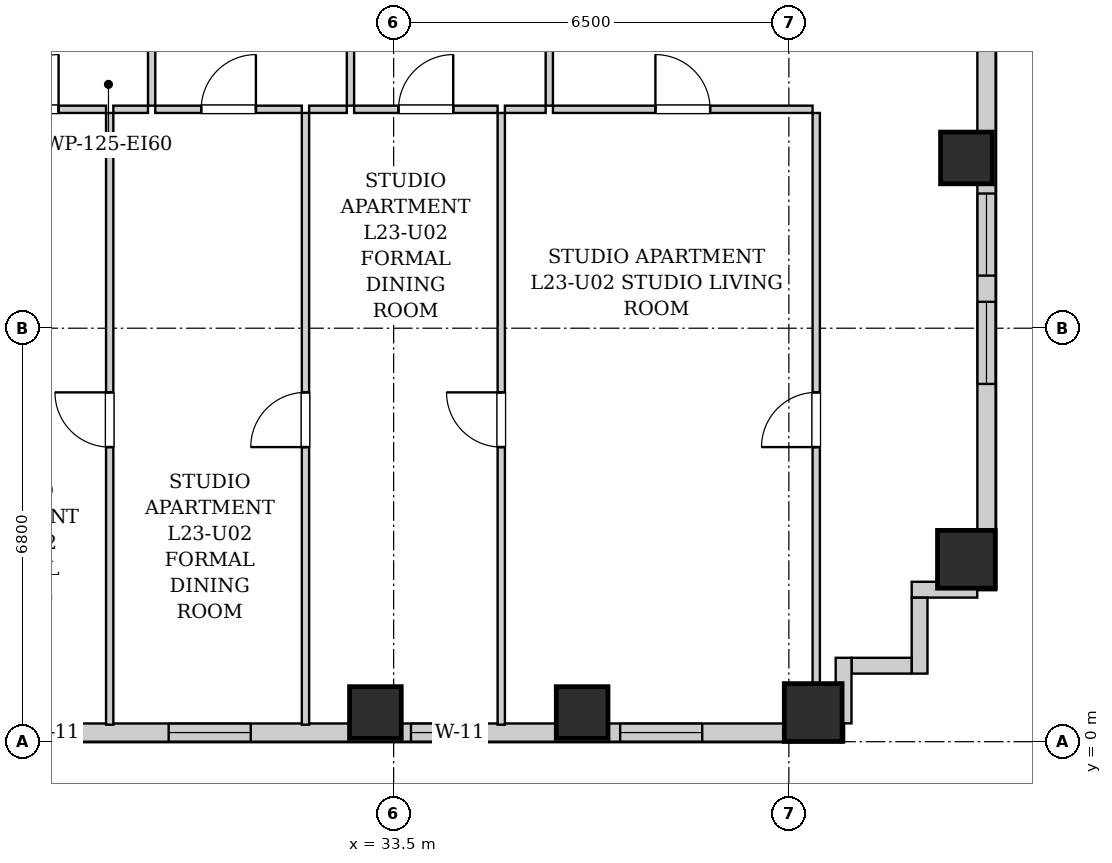
"""IFC4 building model, lengths in metres.
Left out: names, types, materials, properties, quantities, classifications, styles, units other than length and angle.
Written with IfcOpenShell. Run it as: python <this file> out.ifc"""

import sys

from ifc_helpers import new_model, si_unit, direction, frame, frame_2d, origin, origin_2d, place, context, subcontext, project, spatial, rectangle, extrude, element, fill, save


model = new_model("IFC4")
c1 = context("Model", 3, precision=1e-05, world=origin(), true_north=direction((0.0, 1.0)))
c2 = subcontext(c1, "Body", "Model", "MODEL_VIEW")
j1 = project(units=[si_unit("LENGTHUNIT", "METRE"), si_unit("PLANEANGLEUNIT", "RADIAN")], contexts=[c1])
p1 = place(None, origin())
s1 = spatial("IfcSite", under=j1, at=p1, CompositionType="ELEMENT")
p2 = place(p1, origin())
s2 = spatial("IfcBuilding", under=s1, at=p2, CompositionType="ELEMENT")
p3 = place(p2, frame((0.0, 0.0, 84.7)))
s3 = spatial("IfcBuildingStorey", under=s2, at=p3, CompositionType="ELEMENT", Elevation=84.7)
for number, where, z_axis, x_axis in (
    (1, (33.2, 0.48, 0.0), (0.0, 0.0, 1.0), (1.0, 0.0, 0.0)),
    (2, (36.6, 0.48, 0.0), (0.0, 0.0, 1.0), (1.0, 0.0, 0.0)),
):
    element("IfcColumn", number, at=place(p3, frame(where, z_axis=z_axis, x_axis=x_axis)), inside=s3, PredefinedType="COLUMN", context=c2, shape_type="SweptSolid", body=[
        extrude(rectangle(XDim=0.85, YDim=0.85, at=origin_2d()), origin(), (0.0, 0.0, 1.0), 3.2),
    ])
for number, where, z_axis, x_axis in (
    (3, (40.4, 0.48, 0.0), (0.0, 0.0, 1.0), (1.0, 0.0, 0.0)),
    (4, (42.92, 3.0, 0.0), (0.0, 0.0, 1.0), (1.0, 0.0, 0.0)),
):
    element("IfcColumn", number, at=place(p3, frame(where, z_axis=z_axis, x_axis=x_axis)), inside=s3, PredefinedType="COLUMN", context=c2, shape_type="SweptSolid", body=[
        extrude(rectangle(XDim=0.95, YDim=0.95, at=origin_2d()), origin(), (0.0, 0.0, 1.0), 3.2),
    ])
p4 = place(p3, frame((42.92, 9.6, 0.0), z_axis=(0.0, 0.0, 1.0), x_axis=(1.0, 0.0, 0.0)))
e5 = element("IfcColumn", 5, at=p4, inside=s3, PredefinedType="COLUMN", context=c2, shape_type="SweptSolid", body=[
    extrude(rectangle(XDim=0.85, YDim=0.85, at=origin_2d()), origin(), (0.0, 0.0, 1.0), 3.2),
])
p5 = place(p3, frame((43.25, 24.6, 0.0), z_axis=(0.0, 0.0, 1.0), x_axis=(0.0, -1.0, 0.0)))
e6 = element("IfcWall", 6, at=p5, inside=s3, PredefinedType="SOLIDWALL", context=c2, shape_type="SweptSolid", body=[
    extrude(rectangle(XDim=22.1, YDim=0.3, at=frame_2d((11.05, 0.0))), origin(), (0.0, 0.0, 1.0), 2.94),
])
p6 = place(p5, frame((17.366, 0.0, 0.55)))
e7 = element("IfcOpeningElement", 7, at=p6, cuts=e6, PredefinedType="OPENING", context=c2, shape_type="SweptSolid", body=[
    extrude(rectangle(XDim=1.35, YDim=1.2, at=frame_2d((0.675, 0.6))), frame((0.0, 0.16, 0.0), z_axis=(0.0, -1.0, 0.0), x_axis=(1.0, 0.0, 0.0)), (0.0, 0.0, 1.0), 0.32),
])
p7 = place(p5, frame((15.585, 0.0, 0.55)))
e8 = element("IfcOpeningElement", 8, at=p7, cuts=e6, PredefinedType="OPENING", context=c2, shape_type="SweptSolid", body=[
    extrude(rectangle(XDim=1.35, YDim=1.2, at=frame_2d((0.675, 0.6))), frame((0.0, 0.16, 0.0), z_axis=(0.0, -1.0, 0.0), x_axis=(1.0, 0.0, 0.0)), (0.0, 0.0, 1.0), 0.32),
])
p8 = place(p3, frame((40.9, 0.15, 0.0), z_axis=(0.0, 0.0, 1.0), x_axis=(-1.0, 0.0, 0.0)))
e9 = element("IfcWall", 9, at=p8, inside=s3, PredefinedType="SOLIDWALL", context=c2, shape_type="SweptSolid", body=[
    extrude(rectangle(XDim=22.5, YDim=0.3, at=frame_2d((11.25, 0.0))), origin(), (0.0, 0.0, 1.0), 2.94),
])
p9 = place(p8, frame((19.425, 0.0, 0.55)))
e10 = element("IfcOpeningElement", 10, at=p9, cuts=e9, PredefinedType="OPENING", context=c2, shape_type="SweptSolid", body=[
    extrude(rectangle(XDim=1.35, YDim=1.2, at=frame_2d((0.675, 0.6))), frame((0.0, 0.16, 0.0), z_axis=(0.0, -1.0, 0.0), x_axis=(1.0, 0.0, 0.0)), (0.0, 0.0, 1.0), 0.32),
])
p10 = place(p8, frame((12.55, 0.0, 0.55)))
e11 = element("IfcOpeningElement", 11, at=p10, cuts=e9, PredefinedType="OPENING", context=c2, shape_type="SweptSolid", body=[
    extrude(rectangle(XDim=0.85, YDim=1.2, at=frame_2d((0.425, 0.6))), frame((0.0, 0.16, 0.0), z_axis=(0.0, -1.0, 0.0), x_axis=(1.0, 0.0, 0.0)), (0.0, 0.0, 1.0), 0.32),
])
p11 = place(p8, frame((9.75, 0.0, 0.55)))
e12 = element("IfcOpeningElement", 12, at=p11, cuts=e9, PredefinedType="OPENING", context=c2, shape_type="SweptSolid", body=[
    extrude(rectangle(XDim=1.35, YDim=1.2, at=frame_2d((0.675, 0.6))), frame((0.0, 0.16, 0.0), z_axis=(0.0, -1.0, 0.0), x_axis=(1.0, 0.0, 0.0)), (0.0, 0.0, 1.0), 0.32),
])
p12 = place(p8, frame((6.265, 0.0, 0.55)))
e13 = element("IfcOpeningElement", 13, at=p12, cuts=e9, PredefinedType="OPENING", context=c2, shape_type="SweptSolid", body=[
    extrude(rectangle(XDim=0.85, YDim=1.2, at=frame_2d((0.425, 0.6))), frame((0.0, 0.16, 0.0), z_axis=(0.0, -1.0, 0.0), x_axis=(1.0, 0.0, 0.0)), (0.0, 0.0, 1.0), 0.32),
])
p13 = place(p8, frame((2.325, 0.0, 0.55)))
e14 = element("IfcOpeningElement", 14, at=p13, cuts=e9, PredefinedType="OPENING", context=c2, shape_type="SweptSolid", body=[
    extrude(rectangle(XDim=1.35, YDim=1.2, at=frame_2d((0.675, 0.6))), frame((0.0, 0.16, 0.0), z_axis=(0.0, -1.0, 0.0), x_axis=(1.0, 0.0, 0.0)), (0.0, 0.0, 1.0), 0.32),
])
p14 = place(p3, frame((43.098, 2.5, 0.0), z_axis=(0.0, 0.0, 1.0), x_axis=(-1.0, 0.0, 0.0)))
e15 = element("IfcWall", 15, at=p14, inside=s3, PredefinedType="SOLIDWALL", context=c2, shape_type="SweptSolid", body=[
    extrude(rectangle(XDim=1.078, YDim=0.26, at=frame_2d((0.539, 0.0))), origin(), (0.0, 0.0, 1.0), 2.94),
])
p15 = place(p3, frame((42.15, 2.368, 0.0), z_axis=(0.0, 0.0, 1.0), x_axis=(0.0, -1.0, 0.0)))
e16 = element("IfcWall", 16, at=p15, inside=s3, PredefinedType="SOLIDWALL", context=c2, shape_type="SweptSolid", body=[
    extrude(rectangle(XDim=1.248, YDim=0.26, at=frame_2d((0.624, 0.0))), origin(), (0.0, 0.0, 1.0), 2.94),
])
p16 = place(p3, frame((42.018, 1.25, 0.0), z_axis=(0.0, 0.0, 1.0), x_axis=(-1.0, 0.0, 0.0)))
e17 = element("IfcWall", 17, at=p16, inside=s3, PredefinedType="SOLIDWALL", context=c2, shape_type="SweptSolid", body=[
    extrude(rectangle(XDim=0.986, YDim=0.26, at=frame_2d((0.493, 0.0))), origin(), (0.0, 0.0, 1.0), 2.94),
])
p17 = place(p3, frame((40.9, 1.38, 0.0), z_axis=(0.0, 0.0, 1.0), x_axis=(0.0, -1.0, 0.0)))
e18 = element("IfcWall", 18, at=p17, inside=s3, PredefinedType="SOLIDWALL", context=c2, shape_type="SweptSolid", body=[
    extrude(rectangle(XDim=1.078, YDim=0.26, at=frame_2d((0.539, 0.0))), origin(), (0.0, 0.0, 1.0), 2.94),
])
p18 = place(p3, frame((29.52, 10.46, 0.0), z_axis=(0.0, 0.0, 1.0), x_axis=(0.0, 1.0, 0.0)))
e19 = element("IfcWall", 19, at=p18, inside=s3, PredefinedType="PARTITIONING", context=c2, shape_type="SweptSolid", body=[
    extrude(rectangle(XDim=2.85, YDim=0.12, at=frame_2d((1.425, 0.0))), origin(), (0.0, 0.0, 1.0), 2.94),
])
p19 = place(p18, frame((0.975, 0.0, 0.0)))
e20 = element("IfcOpeningElement", 20, at=p19, cuts=e19, PredefinedType="OPENING", context=c2, shape_type="SweptSolid", body=[
    extrude(rectangle(XDim=0.9, YDim=2.05, at=frame_2d((0.45, 1.025))), frame((0.0, 0.07, 0.0), z_axis=(0.0, -1.0, 0.0), x_axis=(1.0, 0.0, 0.0)), (0.0, 0.0, 1.0), 0.14),
])
p20 = place(p3, frame((26.31, 10.4, 0.0), z_axis=(0.0, 0.0, 1.0), x_axis=(1.0, 0.0, 0.0)))
e21 = element("IfcWall", 21, at=p20, inside=s3, PredefinedType="PARTITIONING", context=c2, shape_type="SweptSolid", body=[
    extrude(rectangle(XDim=2.46, YDim=0.12, at=frame_2d((1.23, 0.0))), origin(), (0.0, 0.0, 1.0), 2.94),
])
p21 = place(p20, frame((0.78, 0.0, 0.0)))
e22 = element("IfcOpeningElement", 22, at=p21, cuts=e21, PredefinedType="OPENING", context=c2, shape_type="SweptSolid", body=[
    extrude(rectangle(XDim=0.9, YDim=2.05, at=frame_2d((0.45, 1.025))), frame((0.0, 0.07, 0.0), z_axis=(0.0, -1.0, 0.0), x_axis=(1.0, 0.0, 0.0)), (0.0, 0.0, 1.0), 0.14),
])
p22 = place(p3, frame((28.89, 10.4, 0.0), z_axis=(0.0, 0.0, 1.0), x_axis=(1.0, 0.0, 0.0)))
e23 = element("IfcWall", 23, at=p22, inside=s3, PredefinedType="PARTITIONING", context=c2, shape_type="SweptSolid", body=[
    extrude(rectangle(XDim=0.57, YDim=0.12, at=frame_2d((0.285, 0.0))), origin(), (0.0, 0.0, 1.0), 2.94),
])
p23 = place(p3, frame((32.79, 10.46, 0.0), z_axis=(0.0, 0.0, 1.0), x_axis=(0.0, 1.0, 0.0)))
e24 = element("IfcWall", 24, at=p23, inside=s3, PredefinedType="PARTITIONING", context=c2, shape_type="SweptSolid", body=[
    extrude(rectangle(XDim=2.85, YDim=0.12, at=frame_2d((1.425, 0.0))), origin(), (0.0, 0.0, 1.0), 2.94),
])
p24 = place(p23, frame((0.975, 0.0, 0.0)))
e25 = element("IfcOpeningElement", 25, at=p24, cuts=e24, PredefinedType="OPENING", context=c2, shape_type="SweptSolid", body=[
    extrude(rectangle(XDim=0.9, YDim=2.05, at=frame_2d((0.45, 1.025))), frame((0.0, 0.07, 0.0), z_axis=(0.0, -1.0, 0.0), x_axis=(1.0, 0.0, 0.0)), (0.0, 0.0, 1.0), 0.14),
])
p25 = place(p3, frame((29.58, 10.4, 0.0), z_axis=(0.0, 0.0, 1.0), x_axis=(1.0, 0.0, 0.0)))
e26 = element("IfcWall", 26, at=p25, inside=s3, PredefinedType="PARTITIONING", context=c2, shape_type="SweptSolid", body=[
    extrude(rectangle(XDim=2.41, YDim=0.12, at=frame_2d((1.205, 0.0))), origin(), (0.0, 0.0, 1.0), 2.94),
])
p26 = place(p25, frame((0.755, 0.0, 0.0)))
e27 = element("IfcOpeningElement", 27, at=p26, cuts=e26, PredefinedType="OPENING", context=c2, shape_type="SweptSolid", body=[
    extrude(rectangle(XDim=0.9, YDim=2.05, at=frame_2d((0.45, 1.025))), frame((0.0, 0.07, 0.0), z_axis=(0.0, -1.0, 0.0), x_axis=(1.0, 0.0, 0.0)), (0.0, 0.0, 1.0), 0.14),
])
p27 = place(p3, frame((32.11, 10.4, 0.0), z_axis=(0.0, 0.0, 1.0), x_axis=(1.0, 0.0, 0.0)))
e28 = element("IfcWall", 28, at=p27, inside=s3, PredefinedType="PARTITIONING", context=c2, shape_type="SweptSolid", body=[
    extrude(rectangle(XDim=0.62, YDim=0.12, at=frame_2d((0.31, 0.0))), origin(), (0.0, 0.0, 1.0), 2.94),
])
p28 = place(p3, frame((36.06, 10.46, 0.0), z_axis=(0.0, 0.0, 1.0), x_axis=(0.0, 1.0, 0.0)))
e29 = element("IfcWall", 29, at=p28, inside=s3, PredefinedType="PARTITIONING", context=c2, shape_type="SweptSolid", body=[
    extrude(rectangle(XDim=2.85, YDim=0.12, at=frame_2d((1.425, 0.0))), origin(), (0.0, 0.0, 1.0), 2.94),
])
p29 = place(p28, frame((0.975, 0.0, 0.0)))
e30 = element("IfcOpeningElement", 30, at=p29, cuts=e29, PredefinedType="OPENING", context=c2, shape_type="SweptSolid", body=[
    extrude(rectangle(XDim=0.9, YDim=2.05, at=frame_2d((0.45, 1.025))), frame((0.0, 0.07, 0.0), z_axis=(0.0, -1.0, 0.0), x_axis=(1.0, 0.0, 0.0)), (0.0, 0.0, 1.0), 0.14),
])
p30 = place(p3, frame((32.85, 10.4, 0.0), z_axis=(0.0, 0.0, 1.0), x_axis=(1.0, 0.0, 0.0)))
e31 = element("IfcWall", 31, at=p30, inside=s3, PredefinedType="PARTITIONING", context=c2, shape_type="SweptSolid", body=[
    extrude(rectangle(XDim=2.36, YDim=0.12, at=frame_2d((1.18, 0.0))), origin(), (0.0, 0.0, 1.0), 2.94),
])
p31 = place(p30, frame((0.73, 0.0, 0.0)))
e32 = element("IfcOpeningElement", 32, at=p31, cuts=e31, PredefinedType="OPENING", context=c2, shape_type="SweptSolid", body=[
    extrude(rectangle(XDim=0.9, YDim=2.05, at=frame_2d((0.45, 1.025))), frame((0.0, 0.07, 0.0), z_axis=(0.0, -1.0, 0.0), x_axis=(1.0, 0.0, 0.0)), (0.0, 0.0, 1.0), 0.14),
])
p32 = place(p3, frame((35.33, 10.4, 0.0), z_axis=(0.0, 0.0, 1.0), x_axis=(1.0, 0.0, 0.0)))
e33 = element("IfcWall", 33, at=p32, inside=s3, PredefinedType="PARTITIONING", context=c2, shape_type="SweptSolid", body=[
    extrude(rectangle(XDim=0.67, YDim=0.12, at=frame_2d((0.335, 0.0))), origin(), (0.0, 0.0, 1.0), 2.94),
])
p33 = place(p3, frame((36.12, 10.4, 0.0), z_axis=(0.0, 0.0, 1.0), x_axis=(1.0, 0.0, 0.0)))
e34 = element("IfcWall", 34, at=p33, inside=s3, PredefinedType="PARTITIONING", context=c2, shape_type="SweptSolid", body=[
    extrude(rectangle(XDim=4.27, YDim=0.12, at=frame_2d((2.135, 0.0))), origin(), (0.0, 0.0, 1.0), 2.94),
])
p34 = place(p33, frame((1.685, 0.0, 0.0)))
e35 = element("IfcOpeningElement", 35, at=p34, cuts=e34, PredefinedType="OPENING", context=c2, shape_type="SweptSolid", body=[
    extrude(rectangle(XDim=0.9, YDim=2.05, at=frame_2d((0.45, 1.025))), frame((0.0, 0.07, 0.0), z_axis=(0.0, -1.0, 0.0), x_axis=(1.0, 0.0, 0.0)), (0.0, 0.0, 1.0), 0.14),
])
p35 = place(p3, frame((28.83, 0.28, 0.0), z_axis=(0.0, 0.0, 1.0), x_axis=(0.0, 1.0, 0.0)))
e36 = element("IfcWall", 36, at=p35, inside=s3, PredefinedType="PARTITIONING", context=c2, shape_type="SweptSolid", body=[
    extrude(rectangle(XDim=10.06, YDim=0.12, at=frame_2d((5.03, 0.0))), origin(), (0.0, 0.0, 1.0), 2.94),
])
p36 = place(p35, frame((4.565, 0.0, 0.0)))
e37 = element("IfcOpeningElement", 37, at=p36, cuts=e36, PredefinedType="OPENING", context=c2, shape_type="SweptSolid", body=[
    extrude(rectangle(XDim=0.9, YDim=2.05, at=frame_2d((0.45, 1.025))), frame((0.0, 0.07, 0.0), z_axis=(0.0, -1.0, 0.0), x_axis=(1.0, 0.0, 0.0)), (0.0, 0.0, 1.0), 0.14),
])
p37 = place(p3, frame((32.05, 0.28, 0.0), z_axis=(0.0, 0.0, 1.0), x_axis=(0.0, 1.0, 0.0)))
e38 = element("IfcWall", 38, at=p37, inside=s3, PredefinedType="PARTITIONING", context=c2, shape_type="SweptSolid", body=[
    extrude(rectangle(XDim=10.06, YDim=0.12, at=frame_2d((5.03, 0.0))), origin(), (0.0, 0.0, 1.0), 2.94),
])
p38 = place(p37, frame((4.565, 0.0, 0.0)))
e39 = element("IfcOpeningElement", 39, at=p38, cuts=e38, PredefinedType="OPENING", context=c2, shape_type="SweptSolid", body=[
    extrude(rectangle(XDim=0.9, YDim=2.05, at=frame_2d((0.45, 1.025))), frame((0.0, 0.07, 0.0), z_axis=(0.0, -1.0, 0.0), x_axis=(1.0, 0.0, 0.0)), (0.0, 0.0, 1.0), 0.14),
])
p39 = place(p3, frame((35.27, 0.28, 0.0), z_axis=(0.0, 0.0, 1.0), x_axis=(0.0, 1.0, 0.0)))
e40 = element("IfcWall", 40, at=p39, inside=s3, PredefinedType="PARTITIONING", context=c2, shape_type="SweptSolid", body=[
    extrude(rectangle(XDim=10.06, YDim=0.12, at=frame_2d((5.03, 0.0))), origin(), (0.0, 0.0, 1.0), 2.94),
])
p40 = place(p39, frame((4.565, 0.0, 0.0)))
e41 = element("IfcOpeningElement", 41, at=p40, cuts=e40, PredefinedType="OPENING", context=c2, shape_type="SweptSolid", body=[
    extrude(rectangle(XDim=0.9, YDim=2.05, at=frame_2d((0.45, 1.025))), frame((0.0, 0.07, 0.0), z_axis=(0.0, -1.0, 0.0), x_axis=(1.0, 0.0, 0.0)), (0.0, 0.0, 1.0), 0.14),
])
p41 = place(p3, frame((40.45, 0.28, 0.0), z_axis=(0.0, 0.0, 1.0), x_axis=(0.0, 1.0, 0.0)))
e42 = element("IfcWall", 42, at=p41, inside=s3, PredefinedType="PARTITIONING", context=c2, shape_type="SweptSolid", body=[
    extrude(rectangle(XDim=10.06, YDim=0.12, at=frame_2d((5.03, 0.0))), origin(), (0.0, 0.0, 1.0), 2.94),
])
p42 = place(p41, frame((4.565, 0.0, 0.0)))
e43 = element("IfcOpeningElement", 43, at=p42, cuts=e42, PredefinedType="OPENING", context=c2, shape_type="SweptSolid", body=[
    extrude(rectangle(XDim=0.9, YDim=2.05, at=frame_2d((0.45, 1.025))), frame((0.0, 0.07, 0.0), z_axis=(0.0, -1.0, 0.0), x_axis=(1.0, 0.0, 0.0)), (0.0, 0.0, 1.0), 0.14),
])
p43 = place(p21, origin())
e44 = element("IfcDoor", 44, at=p43, inside=s3, OperationType="SINGLE_SWING_RIGHT", PredefinedType="DOOR", context=c2, shape_type="SweptSolid", body=[
    extrude(rectangle(XDim=0.9, YDim=2.05, at=frame_2d((0.45, 1.025))), frame((0.0, 0.025, 0.0), z_axis=(0.0, -1.0, 0.0), x_axis=(1.0, 0.0, 0.0)), (0.0, 0.0, 1.0), 0.05),
])
fill(e22, e44)
p44 = place(p26, origin())
e45 = element("IfcDoor", 45, at=p44, inside=s3, OperationType="SINGLE_SWING_RIGHT", PredefinedType="DOOR", context=c2, shape_type="SweptSolid", body=[
    extrude(rectangle(XDim=0.9, YDim=2.05, at=frame_2d((0.45, 1.025))), frame((0.0, 0.025, 0.0), z_axis=(0.0, -1.0, 0.0), x_axis=(1.0, 0.0, 0.0)), (0.0, 0.0, 1.0), 0.05),
])
fill(e27, e45)
p45 = place(p31, origin())
e46 = element("IfcDoor", 46, at=p45, inside=s3, OperationType="SINGLE_SWING_RIGHT", PredefinedType="DOOR", context=c2, shape_type="SweptSolid", body=[
    extrude(rectangle(XDim=0.9, YDim=2.05, at=frame_2d((0.45, 1.025))), frame((0.0, 0.025, 0.0), z_axis=(0.0, -1.0, 0.0), x_axis=(1.0, 0.0, 0.0)), (0.0, 0.0, 1.0), 0.05),
])
fill(e32, e46)
p46 = place(p34, origin())
e47 = element("IfcDoor", 47, at=p46, inside=s3, OperationType="SINGLE_SWING_LEFT", PredefinedType="DOOR", context=c2, shape_type="SweptSolid", body=[
    extrude(rectangle(XDim=0.9, YDim=2.05, at=frame_2d((0.45, 1.025))), frame((0.0, 0.025, 0.0), z_axis=(0.0, -1.0, 0.0), x_axis=(1.0, 0.0, 0.0)), (0.0, 0.0, 1.0), 0.05),
])
fill(e35, e47)
p47 = place(p36, origin())
e48 = element("IfcDoor", 48, at=p47, inside=s3, OperationType="SINGLE_SWING_RIGHT", PredefinedType="DOOR", context=c2, shape_type="SweptSolid", body=[
    extrude(rectangle(XDim=0.9, YDim=2.05, at=frame_2d((0.45, 1.025))), frame((0.0, 0.025, 0.0), z_axis=(0.0, -1.0, 0.0), x_axis=(1.0, 0.0, 0.0)), (0.0, 0.0, 1.0), 0.05),
])
fill(e37, e48)
p48 = place(p38, origin())
e49 = element("IfcDoor", 49, at=p48, inside=s3, OperationType="SINGLE_SWING_LEFT", PredefinedType="DOOR", context=c2, shape_type="SweptSolid", body=[
    extrude(rectangle(XDim=0.9, YDim=2.05, at=frame_2d((0.45, 1.025))), frame((0.0, 0.025, 0.0), z_axis=(0.0, -1.0, 0.0), x_axis=(1.0, 0.0, 0.0)), (0.0, 0.0, 1.0), 0.05),
])
fill(e39, e49)
p49 = place(p40, origin())
e50 = element("IfcDoor", 50, at=p49, inside=s3, OperationType="SINGLE_SWING_RIGHT", PredefinedType="DOOR", context=c2, shape_type="SweptSolid", body=[
    extrude(rectangle(XDim=0.9, YDim=2.05, at=frame_2d((0.45, 1.025))), frame((0.0, 0.025, 0.0), z_axis=(0.0, -1.0, 0.0), x_axis=(1.0, 0.0, 0.0)), (0.0, 0.0, 1.0), 0.05),
])
fill(e41, e50)
p50 = place(p42, origin())
e51 = element("IfcDoor", 51, at=p50, inside=s3, OperationType="SINGLE_SWING_LEFT", PredefinedType="DOOR", context=c2, shape_type="SweptSolid", body=[
    extrude(rectangle(XDim=0.9, YDim=2.05, at=frame_2d((0.45, 1.025))), frame((0.0, 0.025, 0.0), z_axis=(0.0, -1.0, 0.0), x_axis=(1.0, 0.0, 0.0)), (0.0, 0.0, 1.0), 0.05),
])
fill(e43, e51)
p51 = place(p10, origin())
e52 = element("IfcWindow", 52, at=p51, inside=s3, PartitioningType="SINGLE_PANEL", PredefinedType="WINDOW", context=c2, shape_type="SweptSolid", body=[
    extrude(rectangle(XDim=0.85, YDim=1.2, at=frame_2d((0.425, 0.6))), frame((0.0, 0.03, 0.0), z_axis=(0.0, -1.0, 0.0), x_axis=(1.0, 0.0, 0.0)), (0.0, 0.0, 1.0), 0.06),
])
fill(e11, e52)
p52 = place(p11, origin())
e53 = element("IfcWindow", 53, at=p52, inside=s3, PartitioningType="SINGLE_PANEL", PredefinedType="WINDOW", context=c2, shape_type="SweptSolid", body=[
    extrude(rectangle(XDim=1.35, YDim=1.2, at=frame_2d((0.675, 0.6))), frame((0.0, 0.03, 0.0), z_axis=(0.0, -1.0, 0.0), x_axis=(1.0, 0.0, 0.0)), (0.0, 0.0, 1.0), 0.06),
])
fill(e12, e53)
p53 = place(p12, origin())
e54 = element("IfcWindow", 54, at=p53, inside=s3, PartitioningType="SINGLE_PANEL", PredefinedType="WINDOW", context=c2, shape_type="SweptSolid", body=[
    extrude(rectangle(XDim=0.85, YDim=1.2, at=frame_2d((0.425, 0.6))), frame((0.0, 0.03, 0.0), z_axis=(0.0, -1.0, 0.0), x_axis=(1.0, 0.0, 0.0)), (0.0, 0.0, 1.0), 0.06),
])
fill(e13, e54)
p54 = place(p13, origin())
e55 = element("IfcWindow", 55, at=p54, inside=s3, PartitioningType="SINGLE_PANEL", PredefinedType="WINDOW", context=c2, shape_type="SweptSolid", body=[
    extrude(rectangle(XDim=1.35, YDim=1.2, at=frame_2d((0.675, 0.6))), frame((0.0, 0.03, 0.0), z_axis=(0.0, -1.0, 0.0), x_axis=(1.0, 0.0, 0.0)), (0.0, 0.0, 1.0), 0.06),
])
fill(e14, e55)
p55 = place(p6, origin())
e56 = element("IfcWindow", 56, at=p55, inside=s3, PartitioningType="SINGLE_PANEL", PredefinedType="WINDOW", context=c2, shape_type="SweptSolid", body=[
    extrude(rectangle(XDim=1.35, YDim=1.2, at=frame_2d((0.675, 0.6))), frame((0.0, 0.03, 0.0), z_axis=(0.0, -1.0, 0.0), x_axis=(1.0, 0.0, 0.0)), (0.0, 0.0, 1.0), 0.06),
])
fill(e7, e56)
p56 = place(p7, origin())
e57 = element("IfcWindow", 57, at=p56, inside=s3, PartitioningType="SINGLE_PANEL", PredefinedType="WINDOW", context=c2, shape_type="SweptSolid", body=[
    extrude(rectangle(XDim=1.35, YDim=1.2, at=frame_2d((0.675, 0.6))), frame((0.0, 0.03, 0.0), z_axis=(0.0, -1.0, 0.0), x_axis=(1.0, 0.0, 0.0)), (0.0, 0.0, 1.0), 0.06),
])
fill(e8, e57)
save(model, sys.argv[1])
